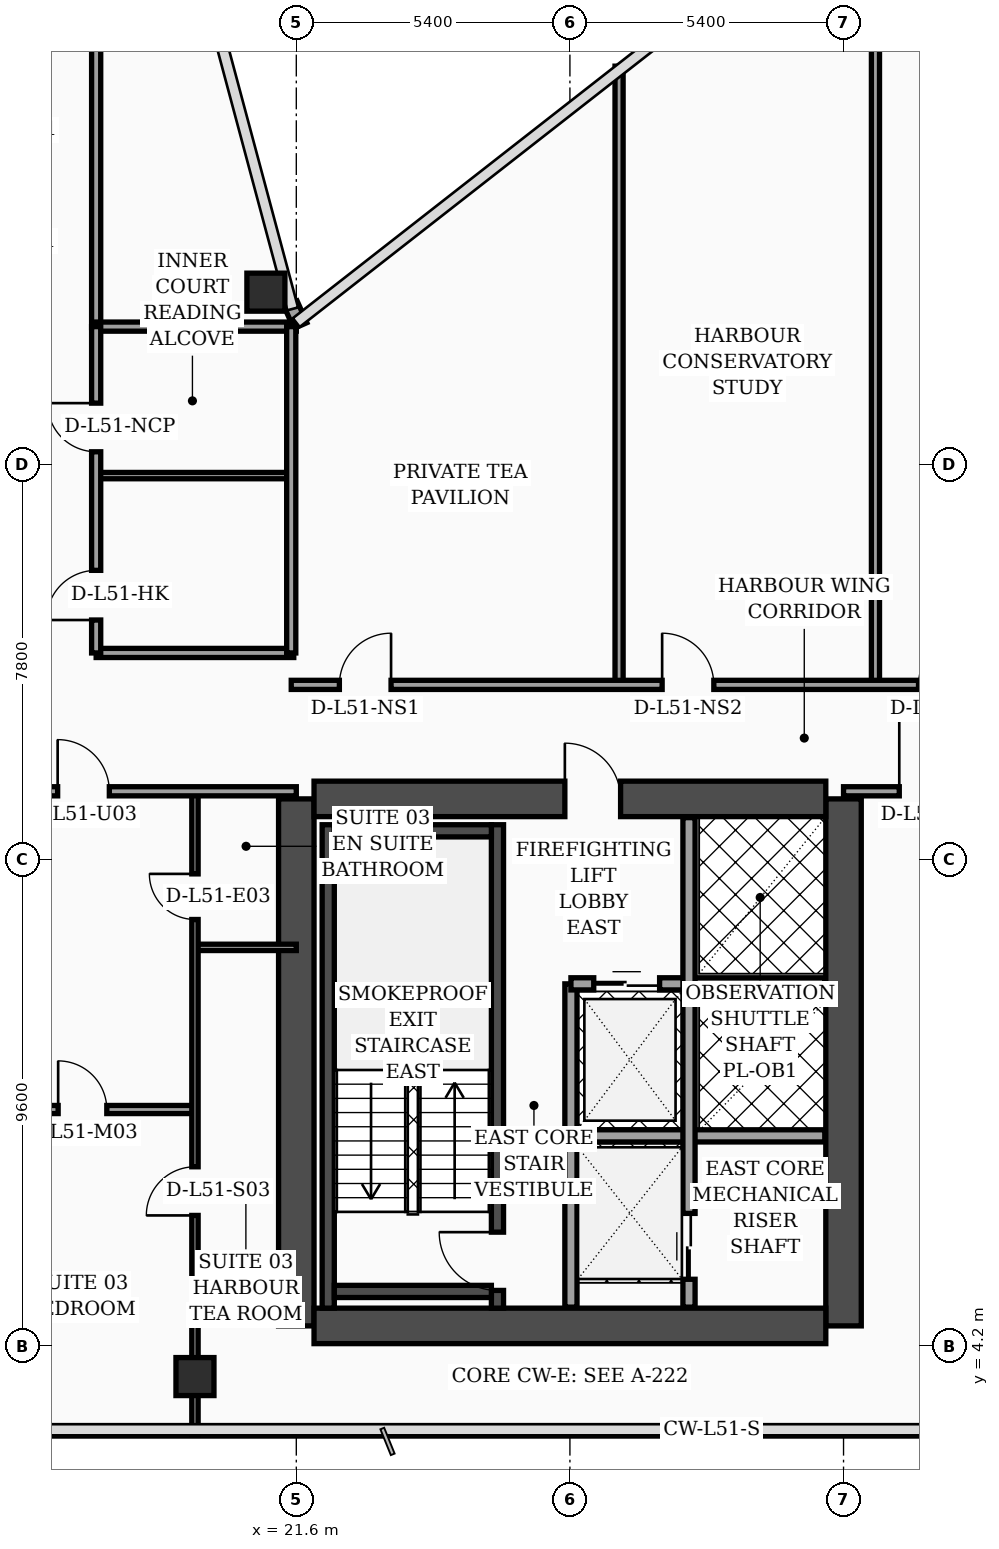
"""IFC4 building model, lengths in metres.
Left out: names, types, materials, properties, quantities, classifications, styles, units other than length and angle.
Written with IfcOpenShell. Run it as: python <this file> out.ifc"""

import sys

from ifc_helpers import new_model, si_unit, direction, frame, frame_2d, origin, origin_2d, place, context, subcontext, project, spatial, rectangle, hollow_rectangle, extrude, element, fill, save


model = new_model("IFC4")
c1 = context("Model", 3, precision=1e-05, world=origin(), true_north=direction((0.0, 1.0)))
c2 = subcontext(c1, "Body", "Model", "MODEL_VIEW")
j1 = project(units=[si_unit("LENGTHUNIT", "METRE"), si_unit("PLANEANGLEUNIT", "RADIAN")], contexts=[c1])
p1 = place(None, origin())
s1 = spatial("IfcSite", under=j1, at=p1, CompositionType="ELEMENT")
p2 = place(p1, origin())
s2 = spatial("IfcBuilding", under=s1, at=p2, CompositionType="ELEMENT")
p3 = place(p2, frame((0.0, 0.0, 207.2)))
s3 = spatial("IfcBuildingStorey", under=s2, at=p3, CompositionType="ELEMENT", Elevation=207.2)
for number, where, z_axis, x_axis in (
    (1, (21.6, 4.6, 0.0), (0.0, 0.0, 1.0), (0.0, 1.0, 0.0)),
    (2, (32.4, 4.6, 0.0), (0.0, 0.0, 1.0), (0.0, 1.0, 0.0)),
):
    element("IfcWall", number, at=place(p3, frame(where, z_axis=z_axis, x_axis=x_axis)), inside=s3, PredefinedType="SHEAR", context=c2, shape_type="SweptSolid", body=[
        extrude(rectangle(XDim=10.4, YDim=0.7, at=frame_2d((5.2, 0.0))), origin(), (0.0, 0.0, 1.0), 3.56),
    ])
p4 = place(p3, frame((21.95, 15.0, 0.0), z_axis=(0.0, 0.0, 1.0), x_axis=(1.0, 0.0, 0.0)))
e3 = element("IfcWall", 3, at=p4, inside=s3, PredefinedType="SHEAR", context=c2, shape_type="SweptSolid", body=[
    extrude(rectangle(XDim=10.1, YDim=0.7, at=frame_2d((5.05, 0.0))), origin(), (0.0, 0.0, 1.0), 3.56),
])
p5 = place(p4, frame((4.95, 0.0, 0.0)))
e4 = element("IfcOpeningElement", 4, at=p5, cuts=e3, PredefinedType="OPENING", context=c2, shape_type="SweptSolid", body=[
    extrude(rectangle(XDim=1.1, YDim=2.2, at=frame_2d((0.55, 1.1))), frame((0.0, 0.36, 0.0), z_axis=(0.0, -1.0, 0.0), x_axis=(1.0, 0.0, 0.0)), (0.0, 0.0, 1.0), 0.72),
])
p6 = place(p3, frame((21.95, 4.6, 0.0), z_axis=(0.0, 0.0, 1.0), x_axis=(1.0, 0.0, 0.0)))
e5 = element("IfcWall", 5, at=p6, inside=s3, PredefinedType="SHEAR", context=c2, shape_type="SweptSolid", body=[
    extrude(rectangle(XDim=10.1, YDim=0.7, at=frame_2d((5.05, 0.0))), origin(), (0.0, 0.0, 1.0), 3.56),
])
p7 = place(p3, frame((22.23, 4.95, 0.0), z_axis=(0.0, 0.0, 1.0), x_axis=(0.0, 1.0, 0.0)))
e6 = element("IfcWall", 6, at=p7, inside=s3, PredefinedType="SOLIDWALL", context=c2, shape_type="SweptSolid", body=[
    extrude(rectangle(XDim=9.54, YDim=0.24, at=frame_2d((4.77, 0.0))), origin(), (0.0, 0.0, 1.0), 3.56),
])
p8 = place(p3, frame((25.57, 4.95, 0.0), z_axis=(0.0, 0.0, 1.0), x_axis=(0.0, 1.0, 0.0)))
e7 = element("IfcWall", 7, at=p8, inside=s3, PredefinedType="SOLIDWALL", context=c2, shape_type="SweptSolid", body=[
    extrude(rectangle(XDim=9.54, YDim=0.24, at=frame_2d((4.77, 0.0))), origin(), (0.0, 0.0, 1.0), 3.56),
])
p9 = place(p8, frame((0.35, 0.0, 0.0)))
e8 = element("IfcOpeningElement", 8, at=p9, cuts=e7, PredefinedType="OPENING", context=c2, shape_type="SweptSolid", body=[
    extrude(rectangle(XDim=1.15, YDim=2.2, at=frame_2d((0.575, 1.1))), frame((0.0, 0.13, 0.0), z_axis=(0.0, -1.0, 0.0), x_axis=(1.0, 0.0, 0.0)), (0.0, 0.0, 1.0), 0.26),
])
for number, where, z_axis, x_axis in (
    (9, (22.35, 5.28, 0.0), (0.0, 0.0, 1.0), (1.0, 0.0, 0.0)),
    (10, (22.35, 14.37, 0.0), (0.0, 0.0, 1.0), (1.0, 0.0, 0.0)),
):
    element("IfcWall", number, at=place(p3, frame(where, z_axis=z_axis, x_axis=x_axis)), inside=s3, PredefinedType="SOLIDWALL", context=c2, shape_type="SweptSolid", body=[
        extrude(rectangle(XDim=3.1, YDim=0.24, at=frame_2d((1.55, 0.0))), origin(), (0.0, 0.0, 1.0), 3.56),
    ])
for number, where, z_axis, x_axis in (
    (11, (21.0, 25.0, 0.0), (0.0, 0.0, 1.0), (1.0, 0.0, 0.0)),
    (12, (19.6, 3.6, 0.0), (0.0, 0.0, 1.0), (1.0, 0.0, 0.0)),
):
    element("IfcColumn", number, at=place(p3, frame(where, z_axis=z_axis, x_axis=x_axis)), inside=s3, PredefinedType="COLUMN", context=c2, shape_type="SweptSolid", body=[
        extrude(hollow_rectangle(XDim=0.75, YDim=0.75, WallThickness=0.032, at=origin_2d()), origin(), (0.0, 0.0, 1.0), 3.56),
    ])
p10 = place(p3, frame((21.68, 24.34, 0.0), z_axis=(0.0, 0.0, 1.0), x_axis=(-0.40758134973, 0.913168901875, 0.0)))
e13 = element("IfcWall", 13, at=p10, inside=s3, PredefinedType="SOLIDWALL", context=c2, shape_type="SweptSolid", body=[
    extrude(rectangle(XDim=0.471, YDim=0.28, at=frame_2d((0.235, 0.0))), origin(), (0.0, 0.0, 1.0), 3.56),
])
p11 = place(p3, frame((27.02, 4.97, 0.0), z_axis=(0.0, 0.0, 1.0), x_axis=(0.0, 1.0, 0.0)))
e14 = element("IfcWall", 14, at=p11, inside=s3, PredefinedType="SOLIDWALL", context=c2, shape_type="SweptSolid", body=[
    extrude(rectangle(XDim=6.38, YDim=0.24, at=frame_2d((3.19, 0.0))), origin(), (0.0, 0.0, 1.0), 3.56),
])
p12 = place(p3, frame((27.02, 11.35, 0.0), z_axis=(0.0, 0.0, 1.0), x_axis=(1.0, 0.0, 0.0)))
e15 = element("IfcWall", 15, at=p12, inside=s3, PredefinedType="SOLIDWALL", context=c2, shape_type="SweptSolid", body=[
    extrude(rectangle(XDim=5.01, YDim=0.24, at=frame_2d((2.505, 0.0))), origin(), (0.0, 0.0, 1.0), 3.56),
])
p13 = place(p12, frame((0.45, 0.0, 0.0)))
e16 = element("IfcOpeningElement", 16, at=p13, cuts=e15, PredefinedType="OPENING", context=c2, shape_type="SweptSolid", body=[
    extrude(rectangle(XDim=1.3, YDim=2.35, at=frame_2d((0.65, 1.175))), frame((0.0, 0.13, 0.0), z_axis=(0.0, -1.0, 0.0), x_axis=(1.0, 0.0, 0.0)), (0.0, 0.0, 1.0), 0.26),
])
p14 = place(p3, frame((27.02, 8.35, 0.0), z_axis=(0.0, 0.0, 1.0), x_axis=(1.0, 0.0, 0.0)))
e17 = element("IfcWall", 17, at=p14, inside=s3, PredefinedType="SOLIDWALL", context=c2, shape_type="SweptSolid", body=[
    extrude(rectangle(XDim=5.01, YDim=0.24, at=frame_2d((2.505, 0.0))), origin(), (0.0, 0.0, 1.0), 3.56),
])
p15 = place(p3, frame((29.35, 4.97, 0.0), z_axis=(0.0, 0.0, 1.0), x_axis=(0.0, 1.0, 0.0)))
e18 = element("IfcWall", 18, at=p15, inside=s3, PredefinedType="SOLIDWALL", context=c2, shape_type="SweptSolid", body=[
    extrude(rectangle(XDim=9.66, YDim=0.24, at=frame_2d((4.83, 0.0))), origin(), (0.0, 0.0, 1.0), 3.56),
])
p16 = place(p15, frame((0.55, 0.0, 0.0)))
e19 = element("IfcOpeningElement", 19, at=p16, cuts=e18, PredefinedType="OPENING", context=c2, shape_type="SweptSolid", body=[
    extrude(rectangle(XDim=1.3, YDim=2.35, at=frame_2d((0.65, 1.175))), frame((0.0, 0.13, 0.0), z_axis=(0.0, -1.0, 0.0), x_axis=(1.0, 0.0, 0.0)), (0.0, 0.0, 1.0), 0.26),
])
p17 = place(p3, frame((19.6, 12.07, 0.0), z_axis=(0.0, 0.0, 1.0), x_axis=(1.0, 0.0, 0.0)))
e20 = element("IfcWall", 20, at=p17, inside=s3, PredefinedType="PARTITIONING", context=c2, shape_type="SweptSolid", body=[
    extrude(rectangle(XDim=2.0, YDim=0.125, at=frame_2d((1.0, 0.0))), origin(), (0.0, 0.0, 1.0), 3.56),
])
p18 = place(p3, frame((15.15, 8.87, 0.0), z_axis=(0.0, 0.0, 1.0), x_axis=(1.0, 0.0, 0.0)))
e21 = element("IfcWall", 21, at=p18, inside=s3, PredefinedType="PARTITIONING", context=c2, shape_type="SweptSolid", body=[
    extrude(rectangle(XDim=4.45, YDim=0.16, at=frame_2d((2.225, 0.0))), origin(), (0.0, 0.0, 1.0), 3.56),
])
p19 = place(p18, frame((1.75, 0.0, 0.0)))
e22 = element("IfcOpeningElement", 22, at=p19, cuts=e21, PredefinedType="OPENING", context=c2, shape_type="SweptSolid", body=[
    extrude(rectangle(XDim=0.96, YDim=2.2, at=frame_2d((0.48, 1.1))), frame((0.0, 0.09, 0.0), z_axis=(0.0, -1.0, 0.0), x_axis=(1.0, 0.0, 0.0)), (0.0, 0.0, 1.0), 0.18),
])
p20 = place(p3, frame((19.6, 2.44, 0.0), z_axis=(0.0, 0.0, 1.0), x_axis=(0.0, 1.0, 0.0)))
e23 = element("IfcWall", 23, at=p20, inside=s3, PredefinedType="PARTITIONING", context=c2, shape_type="SweptSolid", body=[
    extrude(rectangle(XDim=12.71, YDim=0.125, at=frame_2d((6.355, 0.0))), origin(), (0.0, 0.0, 1.0), 2.59),
])
p21 = place(p20, frame((4.34, 0.0, 0.0)))
e24 = element("IfcOpeningElement", 24, at=p21, cuts=e23, PredefinedType="OPENING", context=c2, shape_type="SweptSolid", body=[
    extrude(rectangle(XDim=0.96, YDim=2.2, at=frame_2d((0.48, 1.1))), frame((0.0, 0.073, 0.0), z_axis=(0.0, -1.0, 0.0), x_axis=(1.0, 0.0, 0.0)), (0.0, 0.0, 1.0), 0.145),
])
p22 = place(p20, frame((10.18, 0.0, 0.0)))
e25 = element("IfcOpeningElement", 25, at=p22, cuts=e23, PredefinedType="OPENING", context=c2, shape_type="SweptSolid", body=[
    extrude(rectangle(XDim=0.9, YDim=2.15, at=frame_2d((0.45, 1.075))), frame((0.0, 0.073, 0.0), z_axis=(0.0, -1.0, 0.0), x_axis=(1.0, 0.0, 0.0)), (0.0, 0.0, 1.0), 0.145),
])
p23 = place(p3, frame((15.15, 15.15, 0.0), z_axis=(0.0, 0.0, 1.0), x_axis=(1.0, 0.0, 0.0)))
e26 = element("IfcWall", 26, at=p23, inside=s3, PredefinedType="PARTITIONING", context=c2, shape_type="SweptSolid", body=[
    extrude(rectangle(XDim=6.45, YDim=0.18, at=frame_2d((3.225, 0.0))), origin(), (0.0, 0.0, 1.0), 2.59),
])
p24 = place(p23, frame((1.74, 0.0, 0.0)))
e27 = element("IfcOpeningElement", 27, at=p24, cuts=e26, PredefinedType="OPENING", context=c2, shape_type="SweptSolid", body=[
    extrude(rectangle(XDim=1.02, YDim=2.2, at=frame_2d((0.51, 1.1))), frame((0.0, 0.1, 0.0), z_axis=(0.0, -1.0, 0.0), x_axis=(1.0, 0.0, 0.0)), (0.0, 0.0, 1.0), 0.2),
])
p25 = place(p3, frame((17.65, 24.3, 0.0), z_axis=(0.0, 0.0, 1.0), x_axis=(0.0, 1.0, 0.0)))
e28 = element("IfcWall", 28, at=p25, inside=s3, PredefinedType="PARTITIONING", context=c2, shape_type="SweptSolid", body=[
    extrude(rectangle(XDim=18.15, YDim=0.18, at=frame_2d((9.075, 0.0))), origin(), (0.0, 0.0, 1.0), 2.94),
])
p26 = place(p3, frame((17.65, 17.88, 0.0), z_axis=(0.0, 0.0, 1.0), x_axis=(1.0, 0.0, 0.0)))
e29 = element("IfcWall", 29, at=p26, inside=s3, PredefinedType="PARTITIONING", context=c2, shape_type="SweptSolid", body=[
    extrude(rectangle(XDim=3.9, YDim=0.18, at=frame_2d((1.95, 0.0))), origin(), (0.0, 0.0, 1.0), 3.56),
])
p27 = place(p3, frame((17.65, 21.38, 0.0), z_axis=(0.0, 0.0, 1.0), x_axis=(1.0, 0.0, 0.0)))
e30 = element("IfcWall", 30, at=p27, inside=s3, PredefinedType="PARTITIONING", context=c2, shape_type="SweptSolid", body=[
    extrude(rectangle(XDim=3.9, YDim=0.125, at=frame_2d((1.95, 0.0))), origin(), (0.0, 0.0, 1.0), 3.09),
])
p28 = place(p3, frame((17.65, 24.32, 0.0), z_axis=(0.0, 0.0, 1.0), x_axis=(1.0, 0.0, 0.0)))
e31 = element("IfcWall", 31, at=p28, inside=s3, PredefinedType="PARTITIONING", context=c2, shape_type="SweptSolid", body=[
    extrude(rectangle(XDim=3.95, YDim=0.18, at=frame_2d((1.975, 0.0))), origin(), (0.0, 0.0, 1.0), 3.56),
])
p29 = place(p3, frame((21.5, 17.88, 0.0), z_axis=(0.0, 0.0, 1.0), x_axis=(0.0, 1.0, 0.0)))
e32 = element("IfcWall", 32, at=p29, inside=s3, PredefinedType="PARTITIONING", context=c2, shape_type="SweptSolid", body=[
    extrude(rectangle(XDim=6.44, YDim=0.18, at=frame_2d((3.22, 0.0))), origin(), (0.0, 0.0, 1.0), 3.09),
])
p30 = place(p3, frame((17.65, 17.88, 0.0), z_axis=(0.0, 0.0, 1.0), x_axis=(0.0, 1.0, 0.0)))
e33 = element("IfcWall", 33, at=p30, inside=s3, PredefinedType="PARTITIONING", context=c2, shape_type="SweptSolid", body=[
    extrude(rectangle(XDim=6.44, YDim=0.18, at=frame_2d((3.22, 0.0))), origin(), (0.0, 0.0, 1.0), 3.09),
])
p31 = place(p30, frame((0.65, 0.0, 0.0)))
e34 = element("IfcOpeningElement", 34, at=p31, cuts=e33, PredefinedType="OPENING", context=c2, shape_type="SweptSolid", body=[
    extrude(rectangle(XDim=0.98, YDim=2.15, at=frame_2d((0.49, 1.075))), frame((0.0, 0.1, 0.0), z_axis=(0.0, -1.0, 0.0), x_axis=(1.0, 0.0, 0.0)), (0.0, 0.0, 1.0), 0.2),
])
p32 = place(p30, frame((3.97, 0.0, 0.0)))
e35 = element("IfcOpeningElement", 35, at=p32, cuts=e33, PredefinedType="OPENING", context=c2, shape_type="SweptSolid", body=[
    extrude(rectangle(XDim=0.96, YDim=2.2, at=frame_2d((0.48, 1.1))), frame((0.0, 0.1, 0.0), z_axis=(0.0, -1.0, 0.0), x_axis=(1.0, 0.0, 0.0)), (0.0, 0.0, 1.0), 0.2),
])
p33 = place(p3, frame((32.4, 15.15, 0.0), z_axis=(0.0, 0.0, 1.0), x_axis=(1.0, 0.0, 0.0)))
e36 = element("IfcWall", 36, at=p33, inside=s3, PredefinedType="PARTITIONING", context=c2, shape_type="SweptSolid", body=[
    extrude(rectangle(XDim=13.2, YDim=0.18, at=frame_2d((6.6, 0.0))), origin(), (0.0, 0.0, 1.0), 2.94),
])
p34 = place(p33, frame((1.1, 0.0, 0.0)))
e37 = element("IfcOpeningElement", 37, at=p34, cuts=e36, PredefinedType="OPENING", context=c2, shape_type="SweptSolid", body=[
    extrude(rectangle(XDim=1.5, YDim=2.22, at=frame_2d((0.75, 1.11))), frame((0.0, 0.1, 0.0), z_axis=(0.0, -1.0, 0.0), x_axis=(1.0, 0.0, 0.0)), (0.0, 0.0, 1.0), 0.2),
])
p35 = place(p33, frame((8.5, 0.0, 0.0)))
e38 = element("IfcOpeningElement", 38, at=p35, cuts=e36, PredefinedType="OPENING", context=c2, shape_type="SweptSolid", body=[
    extrude(rectangle(XDim=1.02, YDim=2.2, at=frame_2d((0.51, 1.1))), frame((0.0, 0.1, 0.0), z_axis=(0.0, -1.0, 0.0), x_axis=(1.0, 0.0, 0.0)), (0.0, 0.0, 1.0), 0.2),
])
p36 = place(p3, frame((27.97, 17.25, 0.0), z_axis=(0.0, 0.0, 1.0), x_axis=(0.0, 1.0, 0.0)))
e39 = element("IfcWall", 39, at=p36, inside=s3, PredefinedType="PARTITIONING", context=c2, shape_type="SweptSolid", body=[
    extrude(rectangle(XDim=12.21, YDim=0.16, at=frame_2d((6.105, 0.0))), origin(), (0.0, 0.0, 1.0), 2.94),
])
p37 = place(p3, frame((33.03, 17.25, 0.0), z_axis=(0.0, 0.0, 1.0), x_axis=(0.0, 1.0, 0.0)))
e40 = element("IfcWall", 40, at=p37, inside=s3, PredefinedType="PARTITIONING", context=c2, shape_type="SweptSolid", body=[
    extrude(rectangle(XDim=16.16, YDim=0.16, at=frame_2d((8.08, 0.0))), origin(), (0.0, 0.0, 1.0), 2.94),
])
p38 = place(p3, frame((21.5, 17.25, 0.0), z_axis=(0.0, 0.0, 1.0), x_axis=(1.0, 0.0, 0.0)))
e41 = element("IfcWall", 41, at=p38, inside=s3, PredefinedType="PARTITIONING", context=c2, shape_type="SweptSolid", body=[
    extrude(rectangle(XDim=17.25, YDim=0.18, at=frame_2d((8.625, 0.0))), origin(), (0.0, 0.0, 1.0), 2.94),
])
p39 = place(p38, frame((0.95, 0.0, 0.0)))
e42 = element("IfcOpeningElement", 42, at=p39, cuts=e41, PredefinedType="OPENING", context=c2, shape_type="SweptSolid", body=[
    extrude(rectangle(XDim=1.02, YDim=2.2, at=frame_2d((0.51, 1.1))), frame((0.0, 0.1, 0.0), z_axis=(0.0, -1.0, 0.0), x_axis=(1.0, 0.0, 0.0)), (0.0, 0.0, 1.0), 0.2),
])
p40 = place(p38, frame((7.32, 0.0, 0.0)))
e43 = element("IfcOpeningElement", 43, at=p40, cuts=e41, PredefinedType="OPENING", context=c2, shape_type="SweptSolid", body=[
    extrude(rectangle(XDim=1.02, YDim=2.2, at=frame_2d((0.51, 1.1))), frame((0.0, 0.1, 0.0), z_axis=(0.0, -1.0, 0.0), x_axis=(1.0, 0.0, 0.0)), (0.0, 0.0, 1.0), 0.2),
])
p41 = place(p38, frame((12.38, 0.0, 0.0)))
e44 = element("IfcOpeningElement", 44, at=p41, cuts=e41, PredefinedType="OPENING", context=c2, shape_type="SweptSolid", body=[
    extrude(rectangle(XDim=1.02, YDim=2.2, at=frame_2d((0.51, 1.1))), frame((0.0, 0.1, 0.0), z_axis=(0.0, -1.0, 0.0), x_axis=(1.0, 0.0, 0.0)), (0.0, 0.0, 1.0), 0.2),
])
p42 = place(p13, origin())
e45 = element("IfcDoor", 45, at=p42, inside=s3, OperationType="DOUBLE_DOOR_SLIDING", PredefinedType="DOOR", context=c2, shape_type="SweptSolid", body=[
    extrude(rectangle(XDim=1.3, YDim=2.35, at=frame_2d((0.65, 1.175))), frame((0.0, 0.025, 0.0), z_axis=(0.0, -1.0, 0.0), x_axis=(1.0, 0.0, 0.0)), (0.0, 0.0, 1.0), 0.05),
])
fill(e16, e45)
p43 = place(p16, origin())
e46 = element("IfcDoor", 46, at=p43, inside=s3, OperationType="DOUBLE_DOOR_SLIDING", PredefinedType="DOOR", context=c2, shape_type="SweptSolid", body=[
    extrude(rectangle(XDim=1.3, YDim=2.35, at=frame_2d((0.65, 1.175))), frame((0.0, 0.025, 0.0), z_axis=(0.0, -1.0, 0.0), x_axis=(1.0, 0.0, 0.0)), (0.0, 0.0, 1.0), 0.05),
])
fill(e19, e46)
p44 = place(p19, origin())
e47 = element("IfcDoor", 47, at=p44, inside=s3, OperationType="SINGLE_SWING_LEFT", PredefinedType="DOOR", context=c2, shape_type="SweptSolid", body=[
    extrude(rectangle(XDim=0.96, YDim=2.2, at=frame_2d((0.48, 1.1))), frame((0.0, 0.025, 0.0), z_axis=(0.0, -1.0, 0.0), x_axis=(1.0, 0.0, 0.0)), (0.0, 0.0, 1.0), 0.05),
])
fill(e22, e47)
p45 = place(p21, origin())
e48 = element("IfcDoor", 48, at=p45, inside=s3, OperationType="SINGLE_SWING_LEFT", PredefinedType="DOOR", context=c2, shape_type="SweptSolid", body=[
    extrude(rectangle(XDim=0.96, YDim=2.2, at=frame_2d((0.48, 1.1))), frame((0.0, 0.025, 0.0), z_axis=(0.0, -1.0, 0.0), x_axis=(1.0, 0.0, 0.0)), (0.0, 0.0, 1.0), 0.05),
])
fill(e24, e48)
p46 = place(p22, origin())
e49 = element("IfcDoor", 49, at=p46, inside=s3, OperationType="SINGLE_SWING_RIGHT", PredefinedType="DOOR", context=c2, shape_type="SweptSolid", body=[
    extrude(rectangle(XDim=0.9, YDim=2.15, at=frame_2d((0.45, 1.075))), frame((0.0, 0.025, 0.0), z_axis=(0.0, -1.0, 0.0), x_axis=(1.0, 0.0, 0.0)), (0.0, 0.0, 1.0), 0.05),
])
fill(e25, e49)
p47 = place(p24, origin())
e50 = element("IfcDoor", 50, at=p47, inside=s3, OperationType="SINGLE_SWING_LEFT", PredefinedType="DOOR", context=c2, shape_type="SweptSolid", body=[
    extrude(rectangle(XDim=1.02, YDim=2.2, at=frame_2d((0.51, 1.1))), frame((0.0, 0.025, 0.0), z_axis=(0.0, -1.0, 0.0), x_axis=(1.0, 0.0, 0.0)), (0.0, 0.0, 1.0), 0.05),
])
fill(e27, e50)
p48 = place(p31, origin())
e51 = element("IfcDoor", 51, at=p48, inside=s3, OperationType="SINGLE_SWING_LEFT", PredefinedType="DOOR", context=c2, shape_type="SweptSolid", body=[
    extrude(rectangle(XDim=0.98, YDim=2.15, at=frame_2d((0.49, 1.075))), frame((0.0, 0.025, 0.0), z_axis=(0.0, -1.0, 0.0), x_axis=(1.0, 0.0, 0.0)), (0.0, 0.0, 1.0), 0.05),
])
fill(e34, e51)
p49 = place(p32, origin())
e52 = element("IfcDoor", 52, at=p49, inside=s3, OperationType="SINGLE_SWING_RIGHT", PredefinedType="DOOR", context=c2, shape_type="SweptSolid", body=[
    extrude(rectangle(XDim=0.96, YDim=2.2, at=frame_2d((0.48, 1.1))), frame((0.0, 0.025, 0.0), z_axis=(0.0, -1.0, 0.0), x_axis=(1.0, 0.0, 0.0)), (0.0, 0.0, 1.0), 0.05),
])
fill(e35, e52)
p50 = place(p34, origin())
e53 = element("IfcDoor", 53, at=p50, inside=s3, OperationType="SINGLE_SWING_LEFT", PredefinedType="DOOR", context=c2, shape_type="SweptSolid", body=[
    extrude(rectangle(XDim=1.5, YDim=2.22, at=frame_2d((0.75, 1.11))), frame((0.0, 0.025, 0.0), z_axis=(0.0, -1.0, 0.0), x_axis=(1.0, 0.0, 0.0)), (0.0, 0.0, 1.0), 0.05),
])
fill(e37, e53)
p51 = place(p39, origin())
e54 = element("IfcDoor", 54, at=p51, inside=s3, OperationType="SINGLE_SWING_RIGHT", PredefinedType="DOOR", context=c2, shape_type="SweptSolid", body=[
    extrude(rectangle(XDim=1.02, YDim=2.2, at=frame_2d((0.51, 1.1))), frame((0.0, 0.025, 0.0), z_axis=(0.0, -1.0, 0.0), x_axis=(1.0, 0.0, 0.0)), (0.0, 0.0, 1.0), 0.05),
])
fill(e42, e54)
p52 = place(p40, origin())
e55 = element("IfcDoor", 55, at=p52, inside=s3, OperationType="SINGLE_SWING_LEFT", PredefinedType="DOOR", context=c2, shape_type="SweptSolid", body=[
    extrude(rectangle(XDim=1.02, YDim=2.2, at=frame_2d((0.51, 1.1))), frame((0.0, 0.025, 0.0), z_axis=(0.0, -1.0, 0.0), x_axis=(1.0, 0.0, 0.0)), (0.0, 0.0, 1.0), 0.05),
])
fill(e43, e55)
p53 = place(p41, origin())
e56 = element("IfcDoor", 56, at=p53, inside=s3, OperationType="SINGLE_SWING_RIGHT", PredefinedType="DOOR", context=c2, shape_type="SweptSolid", body=[
    extrude(rectangle(XDim=1.02, YDim=2.2, at=frame_2d((0.51, 1.1))), frame((0.0, 0.025, 0.0), z_axis=(0.0, -1.0, 0.0), x_axis=(1.0, 0.0, 0.0)), (0.0, 0.0, 1.0), 0.05),
])
fill(e44, e56)
p54 = place(p9, origin())
e57 = element("IfcDoor", 57, at=p54, inside=s3, OperationType="SINGLE_SWING_RIGHT", PredefinedType="DOOR", context=c2, shape_type="SweptSolid", body=[
    extrude(rectangle(XDim=1.15, YDim=2.2, at=frame_2d((0.575, 1.1))), frame((0.0, 0.025, 0.0), z_axis=(0.0, -1.0, 0.0), x_axis=(1.0, 0.0, 0.0)), (0.0, 0.0, 1.0), 0.05),
])
fill(e8, e57)
p55 = place(p5, origin())
e58 = element("IfcDoor", 58, at=p55, inside=s3, OperationType="SINGLE_SWING_LEFT", PredefinedType="DOOR", context=c2, shape_type="SweptSolid", body=[
    extrude(rectangle(XDim=1.1, YDim=2.2, at=frame_2d((0.55, 1.1))), frame((0.0, 0.025, 0.0), z_axis=(0.0, -1.0, 0.0), x_axis=(1.0, 0.0, 0.0)), (0.0, 0.0, 1.0), 0.05),
])
fill(e4, e58)
save(model, sys.argv[1])
